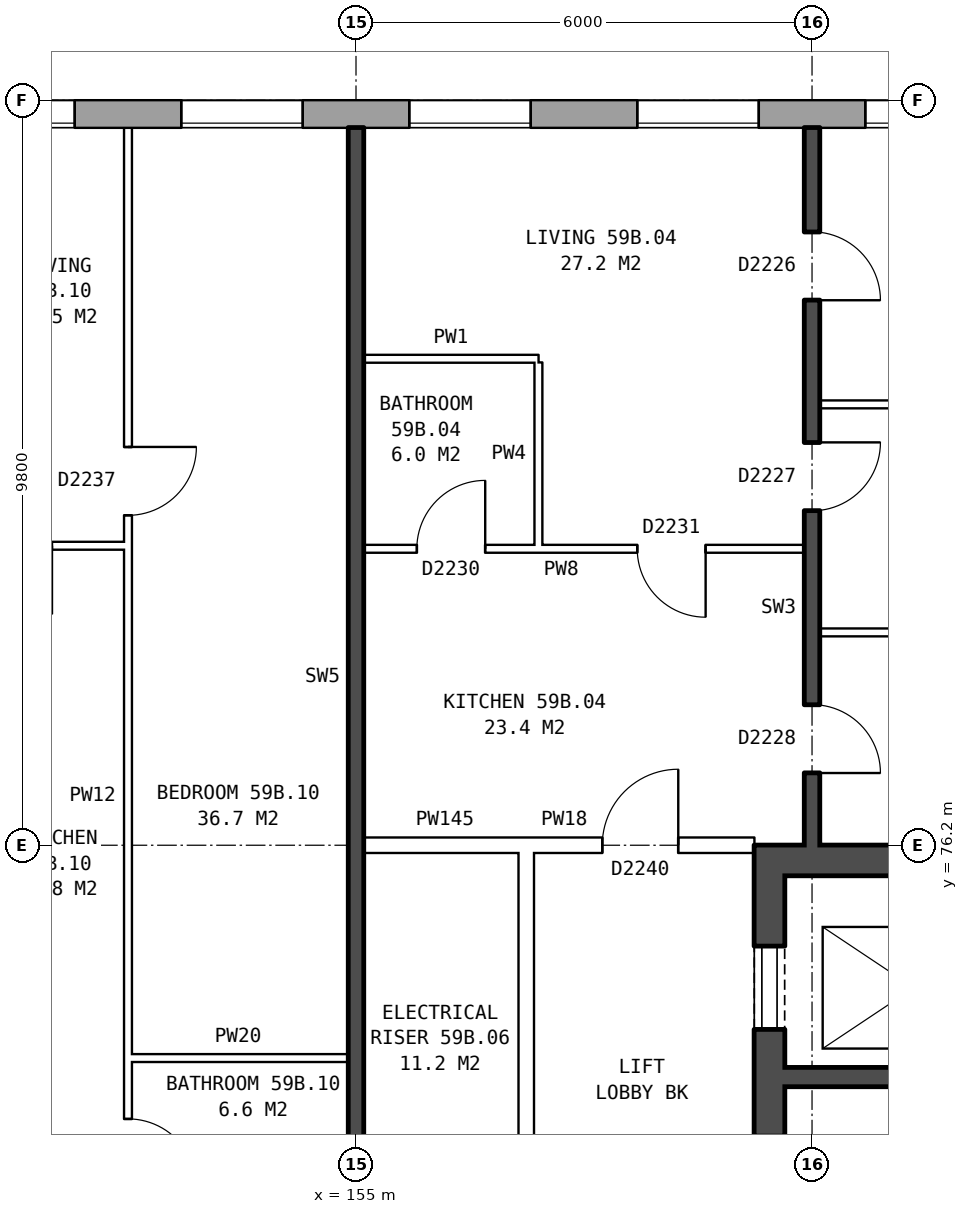
"""IFC4 building model, lengths in metres.
Left out: names, types, materials, properties, quantities, classifications, styles, units other than length and angle.
Written with IfcOpenShell. Run it as: python <this file> out.ifc"""

import sys

from ifc_helpers import new_model, si_unit, direction, frame, frame_2d, origin, place, context, subcontext, project, spatial, rectangle, extrude, element, fill, save


model = new_model("IFC4")
c1 = context("Model", 3, precision=1e-05, world=origin(), true_north=direction((0.0, 1.0)))
c2 = subcontext(c1, "Body", "Model", "MODEL_VIEW")
j1 = project(units=[si_unit("LENGTHUNIT", "METRE"), si_unit("PLANEANGLEUNIT", "RADIAN")], contexts=[c1])
p1 = place(None, origin())
s1 = spatial("IfcSite", under=j1, at=p1, CompositionType="ELEMENT")
p2 = place(p1, origin())
s2 = spatial("IfcBuilding", under=s1, at=p2, CompositionType="ELEMENT")
p3 = place(p2, frame((0.0, 0.0, 209.0)))
s3 = spatial("IfcBuildingStorey", under=s2, at=p3, CompositionType="ELEMENT", Elevation=209.0)
p4 = place(p3, frame((165.925, 85.82, 0.0), z_axis=(0.0, 0.0, 1.0), x_axis=(-1.0, 0.0, 0.0)))
e1 = element("IfcWall", 1, at=p4, inside=s3, PredefinedType="STANDARD", context=c2, shape_type="SweptSolid", body=[
    extrude(rectangle(XDim=33.875, YDim=0.36, at=frame_2d((16.938, 0.0))), origin(), (0.0, 0.0, 1.0), 2.85),
])
p5 = place(p4, frame((2.625, 0.0, 0.8)))
e2 = element("IfcOpeningElement", 2, at=p5, cuts=e1, PredefinedType="OPENING", context=c2, shape_type="SweptSolid", body=[
    extrude(rectangle(XDim=1.6, YDim=1.8, at=frame_2d((0.8, 0.9))), frame((0.0, 0.19, 0.0), z_axis=(0.0, -1.0, 0.0), x_axis=(1.0, 0.0, 0.0)), (0.0, 0.0, 1.0), 0.38),
])
p6 = place(p4, frame((5.625, 0.0, 0.8)))
e3 = element("IfcOpeningElement", 3, at=p6, cuts=e1, PredefinedType="OPENING", context=c2, shape_type="SweptSolid", body=[
    extrude(rectangle(XDim=1.6, YDim=1.8, at=frame_2d((0.8, 0.9))), frame((0.0, 0.19, 0.0), z_axis=(0.0, -1.0, 0.0), x_axis=(1.0, 0.0, 0.0)), (0.0, 0.0, 1.0), 0.38),
])
p7 = place(p4, frame((8.625, 0.0, 0.8)))
e4 = element("IfcOpeningElement", 4, at=p7, cuts=e1, PredefinedType="OPENING", context=c2, shape_type="SweptSolid", body=[
    extrude(rectangle(XDim=1.6, YDim=1.8, at=frame_2d((0.8, 0.9))), frame((0.0, 0.19, 0.0), z_axis=(0.0, -1.0, 0.0), x_axis=(1.0, 0.0, 0.0)), (0.0, 0.0, 1.0), 0.38),
])
p8 = place(p4, frame((11.625, 0.0, 0.8)))
e5 = element("IfcOpeningElement", 5, at=p8, cuts=e1, PredefinedType="OPENING", context=c2, shape_type="SweptSolid", body=[
    extrude(rectangle(XDim=1.6, YDim=1.8, at=frame_2d((0.8, 0.9))), frame((0.0, 0.19, 0.0), z_axis=(0.0, -1.0, 0.0), x_axis=(1.0, 0.0, 0.0)), (0.0, 0.0, 1.0), 0.38),
])
p9 = place(p4, frame((14.625, 0.0, 0.8)))
e6 = element("IfcOpeningElement", 6, at=p9, cuts=e1, PredefinedType="OPENING", context=c2, shape_type="SweptSolid", body=[
    extrude(rectangle(XDim=1.6, YDim=1.8, at=frame_2d((0.8, 0.9))), frame((0.0, 0.19, 0.0), z_axis=(0.0, -1.0, 0.0), x_axis=(1.0, 0.0, 0.0)), (0.0, 0.0, 1.0), 0.38),
])
p10 = place(p4, frame((17.625, 0.0, 0.8)))
e7 = element("IfcOpeningElement", 7, at=p10, cuts=e1, PredefinedType="OPENING", context=c2, shape_type="SweptSolid", body=[
    extrude(rectangle(XDim=1.6, YDim=1.8, at=frame_2d((0.8, 0.9))), frame((0.0, 0.19, 0.0), z_axis=(0.0, -1.0, 0.0), x_axis=(1.0, 0.0, 0.0)), (0.0, 0.0, 1.0), 0.38),
])
p11 = place(p4, frame((20.625, 0.0, 0.8)))
e8 = element("IfcOpeningElement", 8, at=p11, cuts=e1, PredefinedType="OPENING", context=c2, shape_type="SweptSolid", body=[
    extrude(rectangle(XDim=1.6, YDim=1.8, at=frame_2d((0.8, 0.9))), frame((0.0, 0.19, 0.0), z_axis=(0.0, -1.0, 0.0), x_axis=(1.0, 0.0, 0.0)), (0.0, 0.0, 1.0), 0.38),
])
p12 = place(p4, frame((23.625, 0.0, 0.8)))
e9 = element("IfcOpeningElement", 9, at=p12, cuts=e1, PredefinedType="OPENING", context=c2, shape_type="SweptSolid", body=[
    extrude(rectangle(XDim=1.6, YDim=1.8, at=frame_2d((0.8, 0.9))), frame((0.0, 0.19, 0.0), z_axis=(0.0, -1.0, 0.0), x_axis=(1.0, 0.0, 0.0)), (0.0, 0.0, 1.0), 0.38),
])
p13 = place(p4, frame((26.625, 0.0, 0.8)))
e10 = element("IfcOpeningElement", 10, at=p13, cuts=e1, PredefinedType="OPENING", context=c2, shape_type="SweptSolid", body=[
    extrude(rectangle(XDim=1.6, YDim=1.8, at=frame_2d((0.8, 0.9))), frame((0.0, 0.19, 0.0), z_axis=(0.0, -1.0, 0.0), x_axis=(1.0, 0.0, 0.0)), (0.0, 0.0, 1.0), 0.38),
])
p14 = place(p4, frame((30.925, 0.0, 1.1)))
e11 = element("IfcOpeningElement", 11, at=p14, cuts=e1, PredefinedType="OPENING", context=c2, shape_type="SweptSolid", body=[
    extrude(rectangle(XDim=0.8, YDim=1.5, at=frame_2d((0.4, 0.75))), frame((0.0, 0.19, 0.0), z_axis=(0.0, -1.0, 0.0), x_axis=(1.0, 0.0, 0.0)), (0.0, 0.0, 1.0), 0.38),
])
p15 = place(p4, frame((32.025, 0.0, 0.8)))
e12 = element("IfcOpeningElement", 12, at=p15, cuts=e1, PredefinedType="OPENING", context=c2, shape_type="SweptSolid", body=[
    extrude(rectangle(XDim=1.4, YDim=1.8, at=frame_2d((0.7, 0.9))), frame((0.0, 0.19, 0.0), z_axis=(0.0, -1.0, 0.0), x_axis=(1.0, 0.0, 0.0)), (0.0, 0.0, 1.0), 0.38),
])
p16 = place(p3, frame((160.44, 76.2, 0.0), z_axis=(0.0, 0.0, 1.0), x_axis=(0.0, -1.0, 0.0)))
e13 = element("IfcWall", 13, at=p16, inside=s3, PredefinedType="SHEAR", context=c2, shape_type="SweptSolid", body=[
    extrude(rectangle(XDim=12.4, YDim=0.4, at=frame_2d((6.2, 0.0))), origin(), (0.0, 0.0, 1.0), 2.85),
])
p17 = place(p16, frame((1.325, 0.0, 0.0)))
e14 = element("IfcOpeningElement", 14, at=p17, cuts=e13, PredefinedType="OPENING", context=c2, shape_type="SweptSolid", body=[
    extrude(rectangle(XDim=1.1, YDim=2.1, at=frame_2d((0.55, 1.05))), frame((0.0, 0.21, 0.0), z_axis=(0.0, -1.0, 0.0), x_axis=(1.0, 0.0, 0.0)), (0.0, 0.0, 1.0), 0.42),
])
p18 = place(p16, frame((3.825, 0.0, 0.0)))
e15 = element("IfcOpeningElement", 15, at=p18, cuts=e13, PredefinedType="OPENING", context=c2, shape_type="SweptSolid", body=[
    extrude(rectangle(XDim=0.85, YDim=2.1, at=frame_2d((0.425, 1.05))), frame((0.0, 0.21, 0.0), z_axis=(0.0, -1.0, 0.0), x_axis=(1.0, 0.0, 0.0)), (0.0, 0.0, 1.0), 0.42),
])
p19 = place(p16, frame((5.975, 0.0, 0.0)))
e16 = element("IfcOpeningElement", 16, at=p19, cuts=e13, PredefinedType="OPENING", context=c2, shape_type="SweptSolid", body=[
    extrude(rectangle(XDim=0.85, YDim=2.1, at=frame_2d((0.425, 1.05))), frame((0.0, 0.21, 0.0), z_axis=(0.0, -1.0, 0.0), x_axis=(1.0, 0.0, 0.0)), (0.0, 0.0, 1.0), 0.42),
])
p20 = place(p16, frame((9.9, 0.0, 0.0)))
e17 = element("IfcOpeningElement", 17, at=p20, cuts=e13, PredefinedType="OPENING", context=c2, shape_type="SweptSolid", body=[
    extrude(rectangle(XDim=1.1, YDim=2.1, at=frame_2d((0.55, 1.05))), frame((0.0, 0.21, 0.0), z_axis=(0.0, -1.0, 0.0), x_axis=(1.0, 0.0, 0.0)), (0.0, 0.0, 1.0), 0.42),
])
p21 = place(p16, frame((8.125, 0.0, 0.0)))
e18 = element("IfcOpeningElement", 18, at=p21, cuts=e13, PredefinedType="OPENING", context=c2, shape_type="SweptSolid", body=[
    extrude(rectangle(XDim=0.85, YDim=2.1, at=frame_2d((0.425, 1.05))), frame((0.0, 0.21, 0.0), z_axis=(0.0, -1.0, 0.0), x_axis=(1.0, 0.0, 0.0)), (0.0, 0.0, 1.0), 0.42),
])
p22 = place(p3, frame((160.64, 76.0, 0.0), z_axis=(0.0, 0.0, 1.0), x_axis=(1.0, 0.0, 0.0)))
e19 = element("IfcWall", 19, at=p22, inside=s3, PredefinedType="SHEAR", context=c2, shape_type="SweptSolid", body=[
    extrude(rectangle(XDim=7.6, YDim=0.4, at=frame_2d((3.8, 0.0))), origin(), (0.0, 0.0, 1.0), 2.85),
])
p23 = place(p3, frame((160.64, 73.15, 0.0), z_axis=(0.0, 0.0, 1.0), x_axis=(1.0, 0.0, 0.0)))
e20 = element("IfcWall", 20, at=p23, inside=s3, PredefinedType="SHEAR", context=c2, shape_type="SweptSolid", body=[
    extrude(rectangle(XDim=4.775, YDim=0.25, at=frame_2d((2.388, 0.0))), origin(), (0.0, 0.0, 1.0), 2.85),
])
p24 = place(p3, frame((157.24, 63.9, 0.0), z_axis=(0.0, 0.0, 1.0), x_axis=(0.0, 1.0, 0.0)))
e21 = element("IfcWall", 21, at=p24, inside=s3, PredefinedType="PARTITIONING", context=c2, shape_type="SweptSolid", body=[
    extrude(rectangle(XDim=12.2, YDim=0.2, at=frame_2d((6.1, 0.0))), origin(), (0.0, 0.0, 1.0), 2.85),
])
p25 = place(p24, frame((5.1, 0.0, 0.0)))
e22 = element("IfcOpeningElement", 22, at=p25, cuts=e21, PredefinedType="OPENING", context=c2, shape_type="SweptSolid", body=[
    extrude(rectangle(XDim=2.0, YDim=2.1, at=frame_2d((1.0, 1.05))), frame((0.0, 0.11, 0.0), z_axis=(0.0, -1.0, 0.0), x_axis=(1.0, 0.0, 0.0)), (0.0, 0.0, 1.0), 0.22),
])
p26 = place(p3, frame((152.0, 73.4, 0.0), z_axis=(0.0, 0.0, 1.0), x_axis=(1.0, 0.0, 0.0)))
e23 = element("IfcWall", 23, at=p26, inside=s3, PredefinedType="PARTITIONING", context=c2, shape_type="SweptSolid", body=[
    extrude(rectangle(XDim=2.9, YDim=0.1, at=frame_2d((1.45, 0.0))), origin(), (0.0, 0.0, 1.0), 2.85),
])
p27 = place(p3, frame((155.1, 76.2, 0.0), z_axis=(0.0, 0.0, 1.0), x_axis=(1.0, 0.0, 0.0)))
e24 = element("IfcWall", 24, at=p27, inside=s3, PredefinedType="PARTITIONING", context=c2, shape_type="SweptSolid", body=[
    extrude(rectangle(XDim=2.14, YDim=0.2, at=frame_2d((1.07, 0.0))), origin(), (0.0, 0.0, 1.0), 2.85),
])
p28 = place(p3, frame((157.24, 76.2, 0.0), z_axis=(0.0, 0.0, 1.0), x_axis=(1.0, 0.0, 0.0)))
e25 = element("IfcWall", 25, at=p28, inside=s3, PredefinedType="PARTITIONING", context=c2, shape_type="SweptSolid", body=[
    extrude(rectangle(XDim=3.0, YDim=0.2, at=frame_2d((1.5, 0.0))), origin(), (0.0, 0.0, 1.0), 2.85),
])
p29 = place(p28, frame((1.0, 0.0, 0.0)))
e26 = element("IfcOpeningElement", 26, at=p29, cuts=e25, PredefinedType="OPENING", context=c2, shape_type="SweptSolid", body=[
    extrude(rectangle(XDim=1.0, YDim=2.1, at=frame_2d((0.5, 1.05))), frame((0.0, 0.11, 0.0), z_axis=(0.0, -1.0, 0.0), x_axis=(1.0, 0.0, 0.0)), (0.0, 0.0, 1.0), 0.22),
])
p30 = place(p3, frame((161.1, 79.0, 0.0), z_axis=(0.0, 0.0, 1.0), x_axis=(1.0, 0.0, 0.0)))
e27 = element("IfcWall", 27, at=p30, inside=s3, PredefinedType="PARTITIONING", context=c2, shape_type="SweptSolid", body=[
    extrude(rectangle(XDim=7.54, YDim=0.1, at=frame_2d((3.77, 0.0))), origin(), (0.0, 0.0, 1.0), 2.85),
])
p31 = place(p3, frame((155.1, 80.1, 0.0), z_axis=(0.0, 0.0, 1.0), x_axis=(1.0, 0.0, 0.0)))
e28 = element("IfcWall", 28, at=p31, inside=s3, PredefinedType="PARTITIONING", context=c2, shape_type="SweptSolid", body=[
    extrude(rectangle(XDim=5.8, YDim=0.1, at=frame_2d((2.9, 0.0))), origin(), (0.0, 0.0, 1.0), 2.85),
])
p32 = place(p31, frame((3.6, 0.0, 0.0)))
e29 = element("IfcOpeningElement", 29, at=p32, cuts=e28, PredefinedType="OPENING", context=c2, shape_type="SweptSolid", body=[
    extrude(rectangle(XDim=0.9, YDim=2.1, at=frame_2d((0.45, 1.05))), frame((0.0, 0.06, 0.0), z_axis=(0.0, -1.0, 0.0), x_axis=(1.0, 0.0, 0.0)), (0.0, 0.0, 1.0), 0.12),
])
p33 = place(p31, frame((0.7, 0.0, 0.0)))
e30 = element("IfcOpeningElement", 30, at=p33, cuts=e28, PredefinedType="OPENING", context=c2, shape_type="SweptSolid", body=[
    extrude(rectangle(XDim=0.9, YDim=2.1, at=frame_2d((0.45, 1.05))), frame((0.0, 0.06, 0.0), z_axis=(0.0, -1.0, 0.0), x_axis=(1.0, 0.0, 0.0)), (0.0, 0.0, 1.0), 0.12),
])
p34 = place(p3, frame((149.1, 80.14, 0.0), z_axis=(0.0, 0.0, 1.0), x_axis=(1.0, 0.0, 0.0)))
e31 = element("IfcWall", 31, at=p34, inside=s3, PredefinedType="PARTITIONING", context=c2, shape_type="SweptSolid", body=[
    extrude(rectangle(XDim=2.9, YDim=0.1, at=frame_2d((1.45, 0.0))), origin(), (0.0, 0.0, 1.0), 2.85),
])
p35 = place(p34, frame((1.0, 0.0, 0.0)))
e32 = element("IfcOpeningElement", 32, at=p35, cuts=e31, PredefinedType="OPENING", context=c2, shape_type="SweptSolid", body=[
    extrude(rectangle(XDim=0.9, YDim=2.1, at=frame_2d((0.45, 1.05))), frame((0.0, 0.06, 0.0), z_axis=(0.0, -1.0, 0.0), x_axis=(1.0, 0.0, 0.0)), (0.0, 0.0, 1.0), 0.12),
])
p36 = place(p3, frame((161.1, 82.0, 0.0), z_axis=(0.0, 0.0, 1.0), x_axis=(1.0, 0.0, 0.0)))
e33 = element("IfcWall", 33, at=p36, inside=s3, PredefinedType="PARTITIONING", context=c2, shape_type="SweptSolid", body=[
    extrude(rectangle(XDim=7.54, YDim=0.1, at=frame_2d((3.77, 0.0))), origin(), (0.0, 0.0, 1.0), 2.85),
])
p37 = place(p3, frame((155.1, 82.6, 0.0), z_axis=(0.0, 0.0, 1.0), x_axis=(1.0, 0.0, 0.0)))
e34 = element("IfcWall", 34, at=p37, inside=s3, PredefinedType="PARTITIONING", context=c2, shape_type="SweptSolid", body=[
    extrude(rectangle(XDim=2.3, YDim=0.1, at=frame_2d((1.15, 0.0))), origin(), (0.0, 0.0, 1.0), 2.85),
])
p38 = place(p3, frame((152.0, 71.3, 0.0), z_axis=(0.0, 0.0, 1.0), x_axis=(0.0, 1.0, 0.0)))
e35 = element("IfcWall", 35, at=p38, inside=s3, PredefinedType="PARTITIONING", context=c2, shape_type="SweptSolid", body=[
    extrude(rectangle(XDim=14.34, YDim=0.1, at=frame_2d((7.17, 0.0))), origin(), (0.0, 0.0, 1.0), 2.85),
])
p39 = place(p38, frame((9.24, 0.0, 0.0)))
e36 = element("IfcOpeningElement", 36, at=p39, cuts=e35, PredefinedType="OPENING", context=c2, shape_type="SweptSolid", body=[
    extrude(rectangle(XDim=0.9, YDim=2.1, at=frame_2d((0.45, 1.05))), frame((0.0, 0.06, 0.0), z_axis=(0.0, -1.0, 0.0), x_axis=(1.0, 0.0, 0.0)), (0.0, 0.0, 1.0), 0.12),
])
p40 = place(p38, frame((0.4, 0.0, 0.0)))
e37 = element("IfcOpeningElement", 37, at=p40, cuts=e35, PredefinedType="OPENING", context=c2, shape_type="SweptSolid", body=[
    extrude(rectangle(XDim=0.9, YDim=2.1, at=frame_2d((0.45, 1.05))), frame((0.0, 0.06, 0.0), z_axis=(0.0, -1.0, 0.0), x_axis=(1.0, 0.0, 0.0)), (0.0, 0.0, 1.0), 0.12),
])
p41 = place(p3, frame((155.0, 71.2, 0.0), z_axis=(0.0, 0.0, 1.0), x_axis=(0.0, 1.0, 0.0)))
e38 = element("IfcWall", 38, at=p41, inside=s3, PredefinedType="SOLIDWALL", context=c2, shape_type="SweptSolid", body=[
    extrude(rectangle(XDim=14.44, YDim=0.2, at=frame_2d((7.22, 0.0))), origin(), (0.0, 0.0, 1.0), 2.85),
])
p42 = place(p3, frame((157.4, 80.15, 0.0), z_axis=(0.0, 0.0, 1.0), x_axis=(0.0, 1.0, 0.0)))
e39 = element("IfcWall", 39, at=p42, inside=s3, PredefinedType="PARTITIONING", context=c2, shape_type="SweptSolid", body=[
    extrude(rectangle(XDim=2.4, YDim=0.1, at=frame_2d((1.2, 0.0))), origin(), (0.0, 0.0, 1.0), 2.85),
])
p43 = place(p3, frame((161.0, 76.2, 0.0), z_axis=(0.0, 0.0, 1.0), x_axis=(0.0, 1.0, 0.0)))
e40 = element("IfcWall", 40, at=p43, inside=s3, PredefinedType="SOLIDWALL", context=c2, shape_type="SweptSolid", body=[
    extrude(rectangle(XDim=9.44, YDim=0.2, at=frame_2d((4.72, 0.0))), origin(), (0.0, 0.0, 1.0), 2.85),
])
p44 = place(p43, frame((7.17, 0.0, 0.0)))
e41 = element("IfcOpeningElement", 41, at=p44, cuts=e40, PredefinedType="OPENING", context=c2, shape_type="SweptSolid", body=[
    extrude(rectangle(XDim=0.9, YDim=2.1, at=frame_2d((0.45, 1.05))), frame((0.0, 0.11, 0.0), z_axis=(0.0, -1.0, 0.0), x_axis=(1.0, 0.0, 0.0)), (0.0, 0.0, 1.0), 0.22),
])
p45 = place(p43, frame((4.4, 0.0, 0.0)))
e42 = element("IfcOpeningElement", 42, at=p45, cuts=e40, PredefinedType="OPENING", context=c2, shape_type="SweptSolid", body=[
    extrude(rectangle(XDim=0.9, YDim=2.1, at=frame_2d((0.45, 1.05))), frame((0.0, 0.11, 0.0), z_axis=(0.0, -1.0, 0.0), x_axis=(1.0, 0.0, 0.0)), (0.0, 0.0, 1.0), 0.22),
])
p46 = place(p43, frame((0.95, 0.0, 0.0)))
e43 = element("IfcOpeningElement", 43, at=p46, cuts=e40, PredefinedType="OPENING", context=c2, shape_type="SweptSolid", body=[
    extrude(rectangle(XDim=0.9, YDim=2.1, at=frame_2d((0.45, 1.05))), frame((0.0, 0.11, 0.0), z_axis=(0.0, -1.0, 0.0), x_axis=(1.0, 0.0, 0.0)), (0.0, 0.0, 1.0), 0.22),
])
p47 = place(p5, origin())
e44 = element("IfcWindow", 44, at=p47, inside=s3, PartitioningType="SINGLE_PANEL", PredefinedType="WINDOW", context=c2, shape_type="SweptSolid", body=[
    extrude(rectangle(XDim=1.6, YDim=1.8, at=frame_2d((0.8, 0.9))), frame((0.0, 0.15, 0.0), z_axis=(0.0, -1.0, 0.0), x_axis=(1.0, 0.0, 0.0)), (0.0, 0.0, 1.0), 0.06),
])
fill(e2, e44)
p48 = place(p6, origin())
e45 = element("IfcWindow", 45, at=p48, inside=s3, PartitioningType="SINGLE_PANEL", PredefinedType="WINDOW", context=c2, shape_type="SweptSolid", body=[
    extrude(rectangle(XDim=1.6, YDim=1.8, at=frame_2d((0.8, 0.9))), frame((0.0, 0.15, 0.0), z_axis=(0.0, -1.0, 0.0), x_axis=(1.0, 0.0, 0.0)), (0.0, 0.0, 1.0), 0.06),
])
fill(e3, e45)
p49 = place(p7, origin())
e46 = element("IfcWindow", 46, at=p49, inside=s3, PartitioningType="SINGLE_PANEL", PredefinedType="WINDOW", context=c2, shape_type="SweptSolid", body=[
    extrude(rectangle(XDim=1.6, YDim=1.8, at=frame_2d((0.8, 0.9))), frame((0.0, 0.15, 0.0), z_axis=(0.0, -1.0, 0.0), x_axis=(1.0, 0.0, 0.0)), (0.0, 0.0, 1.0), 0.06),
])
fill(e4, e46)
p50 = place(p8, origin())
e47 = element("IfcWindow", 47, at=p50, inside=s3, PartitioningType="SINGLE_PANEL", PredefinedType="WINDOW", context=c2, shape_type="SweptSolid", body=[
    extrude(rectangle(XDim=1.6, YDim=1.8, at=frame_2d((0.8, 0.9))), frame((0.0, 0.15, 0.0), z_axis=(0.0, -1.0, 0.0), x_axis=(1.0, 0.0, 0.0)), (0.0, 0.0, 1.0), 0.06),
])
fill(e5, e47)
p51 = place(p9, origin())
e48 = element("IfcWindow", 48, at=p51, inside=s3, PartitioningType="SINGLE_PANEL", PredefinedType="WINDOW", context=c2, shape_type="SweptSolid", body=[
    extrude(rectangle(XDim=1.6, YDim=1.8, at=frame_2d((0.8, 0.9))), frame((0.0, 0.15, 0.0), z_axis=(0.0, -1.0, 0.0), x_axis=(1.0, 0.0, 0.0)), (0.0, 0.0, 1.0), 0.06),
])
fill(e6, e48)
p52 = place(p17, origin())
e49 = element("IfcDoor", 49, at=p52, inside=s3, OperationType="DOUBLE_DOOR_SLIDING", PredefinedType="DOOR", context=c2, shape_type="SweptSolid", body=[
    extrude(rectangle(XDim=1.1, YDim=2.1, at=frame_2d((0.55, 1.05))), frame((0.0, 0.185, 0.0), z_axis=(0.0, -1.0, 0.0), x_axis=(1.0, 0.0, 0.0)), (0.0, 0.0, 1.0), 0.05),
])
fill(e14, e49)
p53 = place(p44, frame((0.9, 0.0, 0.0), z_axis=(0.0, 0.0, 1.0), x_axis=(-1.0, 0.0, 0.0)))
e50 = element("IfcDoor", 50, at=p53, inside=s3, OperationType="SINGLE_SWING_RIGHT", PredefinedType="DOOR", context=c2, shape_type="SweptSolid", body=[
    extrude(rectangle(XDim=0.9, YDim=2.1, at=frame_2d((0.45, 1.05))), frame((0.0, 0.025, 0.0), z_axis=(0.0, -1.0, 0.0), x_axis=(1.0, 0.0, 0.0)), (0.0, 0.0, 1.0), 0.05),
])
fill(e41, e50)
p54 = place(p45, frame((0.9, 0.0, 0.0), z_axis=(0.0, 0.0, 1.0), x_axis=(-1.0, 0.0, 0.0)))
e51 = element("IfcDoor", 51, at=p54, inside=s3, OperationType="SINGLE_SWING_LEFT", PredefinedType="DOOR", context=c2, shape_type="SweptSolid", body=[
    extrude(rectangle(XDim=0.9, YDim=2.1, at=frame_2d((0.45, 1.05))), frame((0.0, 0.025, 0.0), z_axis=(0.0, -1.0, 0.0), x_axis=(1.0, 0.0, 0.0)), (0.0, 0.0, 1.0), 0.05),
])
fill(e42, e51)
p55 = place(p46, frame((0.9, 0.0, 0.0), z_axis=(0.0, 0.0, 1.0), x_axis=(-1.0, 0.0, 0.0)))
e52 = element("IfcDoor", 52, at=p55, inside=s3, OperationType="SINGLE_SWING_RIGHT", PredefinedType="DOOR", context=c2, shape_type="SweptSolid", body=[
    extrude(rectangle(XDim=0.9, YDim=2.1, at=frame_2d((0.45, 1.05))), frame((0.0, 0.025, 0.0), z_axis=(0.0, -1.0, 0.0), x_axis=(1.0, 0.0, 0.0)), (0.0, 0.0, 1.0), 0.05),
])
fill(e43, e52)
p56 = place(p29, origin())
e53 = element("IfcDoor", 53, at=p56, inside=s3, OperationType="SINGLE_SWING_RIGHT", PredefinedType="DOOR", context=c2, shape_type="SweptSolid", body=[
    extrude(rectangle(XDim=1.0, YDim=2.1, at=frame_2d((0.5, 1.05))), frame((0.0, 0.025, 0.0), z_axis=(0.0, -1.0, 0.0), x_axis=(1.0, 0.0, 0.0)), (0.0, 0.0, 1.0), 0.05),
])
fill(e26, e53)
p57 = place(p32, frame((0.9, 0.0, 0.0), z_axis=(0.0, 0.0, 1.0), x_axis=(-1.0, 0.0, 0.0)))
e54 = element("IfcDoor", 54, at=p57, inside=s3, OperationType="SINGLE_SWING_LEFT", PredefinedType="DOOR", context=c2, shape_type="SweptSolid", body=[
    extrude(rectangle(XDim=0.9, YDim=2.1, at=frame_2d((0.45, 1.05))), frame((0.0, 0.025, 0.0), z_axis=(0.0, -1.0, 0.0), x_axis=(1.0, 0.0, 0.0)), (0.0, 0.0, 1.0), 0.05),
])
fill(e29, e54)
p58 = place(p33, origin())
e55 = element("IfcDoor", 55, at=p58, inside=s3, OperationType="SINGLE_SWING_RIGHT", PredefinedType="DOOR", context=c2, shape_type="SweptSolid", body=[
    extrude(rectangle(XDim=0.9, YDim=2.1, at=frame_2d((0.45, 1.05))), frame((0.0, 0.025, 0.0), z_axis=(0.0, -1.0, 0.0), x_axis=(1.0, 0.0, 0.0)), (0.0, 0.0, 1.0), 0.05),
])
fill(e30, e55)
p59 = place(p39, frame((0.9, 0.0, 0.0), z_axis=(0.0, 0.0, 1.0), x_axis=(-1.0, 0.0, 0.0)))
e56 = element("IfcDoor", 56, at=p59, inside=s3, OperationType="SINGLE_SWING_LEFT", PredefinedType="DOOR", context=c2, shape_type="SweptSolid", body=[
    extrude(rectangle(XDim=0.9, YDim=2.1, at=frame_2d((0.45, 1.05))), frame((0.0, 0.025, 0.0), z_axis=(0.0, -1.0, 0.0), x_axis=(1.0, 0.0, 0.0)), (0.0, 0.0, 1.0), 0.05),
])
fill(e36, e56)
p60 = place(p40, frame((0.9, 0.0, 0.0), z_axis=(0.0, 0.0, 1.0), x_axis=(-1.0, 0.0, 0.0)))
e57 = element("IfcDoor", 57, at=p60, inside=s3, OperationType="SINGLE_SWING_RIGHT", PredefinedType="DOOR", context=c2, shape_type="SweptSolid", body=[
    extrude(rectangle(XDim=0.9, YDim=2.1, at=frame_2d((0.45, 1.05))), frame((0.0, 0.025, 0.0), z_axis=(0.0, -1.0, 0.0), x_axis=(1.0, 0.0, 0.0)), (0.0, 0.0, 1.0), 0.05),
])
fill(e37, e57)
save(model, sys.argv[1])
